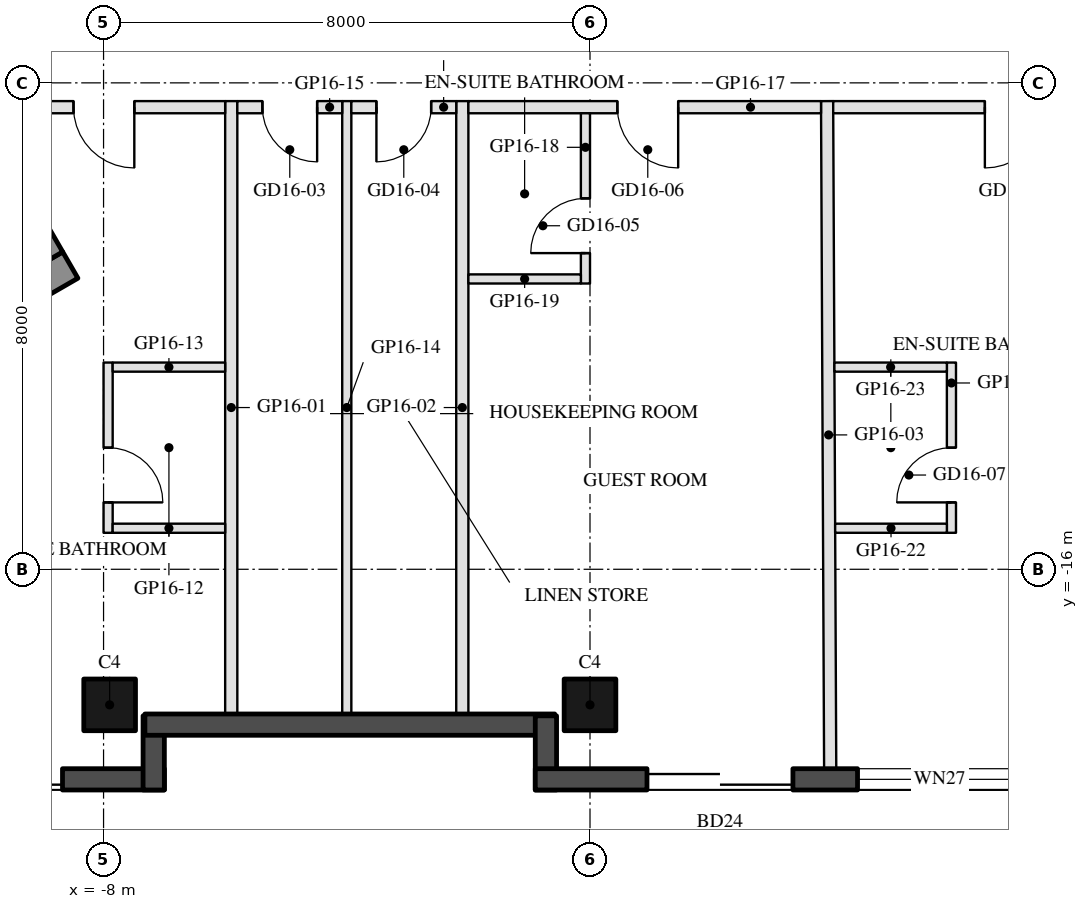
"""IFC4 building model, lengths in metres.
Left out: names, types, materials, properties, quantities, classifications, styles, units other than length and angle.
Written with IfcOpenShell. Run it as: python <this file> out.ifc"""

import sys

from ifc_helpers import new_model, si_unit, direction, frame, frame_2d, origin, origin_2d, place, context, subcontext, project, spatial, rectangle, hollow_rectangle, extrude, element, fill, save


model = new_model("IFC4")
c1 = context("Model", 3, precision=1e-05, world=origin(), true_north=direction((0.0, 1.0)))
c2 = subcontext(c1, "Body", "Model", "MODEL_VIEW")
j1 = project(units=[si_unit("LENGTHUNIT", "METRE"), si_unit("PLANEANGLEUNIT", "RADIAN")], contexts=[c1])
p1 = place(None, origin())
s1 = spatial("IfcSite", under=j1, at=p1, CompositionType="ELEMENT")
p2 = place(p1, origin())
s2 = spatial("IfcBuilding", under=s1, at=p2, CompositionType="ELEMENT")
p3 = place(p2, frame((0.0, 0.0, 179.9)))
s3 = spatial("IfcBuildingStorey", under=s2, at=p3, CompositionType="ELEMENT", Elevation=179.9)
for number, where, z_axis, x_axis in (
    (1, (-7.9, -18.23, 0.0), (0.0, 0.0, 1.0), (-1.0, 0.0, 0.0)),
    (2, (0.0, -18.23, 0.0), (0.0, 0.0, 1.0), (-1.0, 0.0, 0.0)),
):
    element("IfcColumn", number, at=place(p3, frame(where, z_axis=z_axis, x_axis=x_axis)), inside=s3, PredefinedType="COLUMN", context=c2, shape_type="SweptSolid", body=[
        extrude(hollow_rectangle(XDim=0.85, YDim=0.85, WallThickness=0.04, at=origin_2d()), origin(), (0.0, 0.0, 1.0), 3.7),
    ])
p4 = place(p3, frame((-18.816, -19.455, 0.0), z_axis=(0.0, 0.0, 1.0), x_axis=(1.0, 0.0, 0.0)))
e3 = element("IfcWall", 3, at=p4, inside=s3, PredefinedType="SOLIDWALL", context=c2, shape_type="SweptSolid", body=[
    extrude(rectangle(XDim=11.816, YDim=0.35, at=frame_2d((5.908, 0.0))), origin(), (0.0, 0.0, 1.0), 3.55),
])
p5 = place(p4, frame((0.381, 0.0, 0.3)))
e4 = element("IfcOpeningElement", 4, at=p5, cuts=e3, PredefinedType="OPENING", context=c2, shape_type="SweptSolid", body=[
    extrude(rectangle(XDim=1.8, YDim=2.65, at=frame_2d((0.9, 1.325))), frame((0.0, 0.185, 0.0), z_axis=(0.0, -1.0, 0.0), x_axis=(1.0, 0.0, 0.0)), (0.0, 0.0, 1.0), 0.37),
])
p6 = place(p4, frame((7.74, 0.0, 0.0)))
e5 = element("IfcOpeningElement", 5, at=p6, cuts=e3, PredefinedType="OPENING", context=c2, shape_type="SweptSolid", body=[
    extrude(rectangle(XDim=2.4, YDim=2.4, at=frame_2d((1.2, 1.2))), frame((0.0, 0.185, 0.0), z_axis=(0.0, -1.0, 0.0), x_axis=(1.0, 0.0, 0.0)), (0.0, 0.0, 1.0), 0.37),
])
p7 = place(p4, frame((3.791, 0.0, 0.3)))
e6 = element("IfcOpeningElement", 6, at=p7, cuts=e3, PredefinedType="OPENING", context=c2, shape_type="SweptSolid", body=[
    extrude(rectangle(XDim=1.6, YDim=2.65, at=frame_2d((0.8, 1.325))), frame((0.0, 0.185, 0.0), z_axis=(0.0, -1.0, 0.0), x_axis=(1.0, 0.0, 0.0)), (0.0, 0.0, 1.0), 0.37),
])
p8 = place(p4, frame((5.691, 0.0, 0.3)))
e7 = element("IfcOpeningElement", 7, at=p8, cuts=e3, PredefinedType="OPENING", context=c2, shape_type="SweptSolid", body=[
    extrude(rectangle(XDim=1.6, YDim=2.65, at=frame_2d((0.8, 1.325))), frame((0.0, 0.185, 0.0), z_axis=(0.0, -1.0, 0.0), x_axis=(1.0, 0.0, 0.0)), (0.0, 0.0, 1.0), 0.37),
])
p9 = place(p3, frame((-7.175, -19.63, 0.0), z_axis=(0.0, 0.0, 1.0), x_axis=(0.0, 1.0, 0.0)))
e8 = element("IfcWall", 8, at=p9, inside=s3, PredefinedType="SOLIDWALL", context=c2, shape_type="SweptSolid", body=[
    extrude(rectangle(XDim=1.22, YDim=0.35, at=frame_2d((0.61, 0.0))), origin(), (0.0, 0.0, 1.0), 3.55),
])
p10 = place(p3, frame((-7.32, -18.555, 0.0), z_axis=(0.0, 0.0, 1.0), x_axis=(1.0, 0.0, 0.0)))
e9 = element("IfcWall", 9, at=p10, inside=s3, PredefinedType="SOLIDWALL", context=c2, shape_type="SweptSolid", body=[
    extrude(rectangle(XDim=6.74, YDim=0.35, at=frame_2d((3.37, 0.0))), origin(), (0.0, 0.0, 1.0), 3.55),
])
p11 = place(p3, frame((-0.725, -18.41, 0.0), z_axis=(0.0, 0.0, 1.0), x_axis=(0.0, -1.0, 0.0)))
e10 = element("IfcWall", 10, at=p11, inside=s3, PredefinedType="SOLIDWALL", context=c2, shape_type="SweptSolid", body=[
    extrude(rectangle(XDim=1.22, YDim=0.35, at=frame_2d((0.61, 0.0))), origin(), (0.0, 0.0, 1.0), 3.55),
])
p12 = place(p3, frame((-0.9, -19.455, 0.0), z_axis=(0.0, 0.0, 1.0), x_axis=(1.0, 0.0, 0.0)))
e11 = element("IfcWall", 11, at=p12, inside=s3, PredefinedType="SOLIDWALL", context=c2, shape_type="SweptSolid", body=[
    extrude(rectangle(XDim=9.7, YDim=0.35, at=frame_2d((4.85, 0.0))), origin(), (0.0, 0.0, 1.0), 3.55),
])
p13 = place(p12, frame((1.837, 0.0, 0.0)))
e12 = element("IfcOpeningElement", 12, at=p13, cuts=e11, PredefinedType="OPENING", context=c2, shape_type="SweptSolid", body=[
    extrude(rectangle(XDim=2.4, YDim=2.4, at=frame_2d((1.2, 1.2))), frame((0.0, 0.185, 0.0), z_axis=(0.0, -1.0, 0.0), x_axis=(1.0, 0.0, 0.0)), (0.0, 0.0, 1.0), 0.37),
])
p14 = place(p12, frame((5.3, 0.0, 0.3)))
e13 = element("IfcOpeningElement", 13, at=p14, cuts=e11, PredefinedType="OPENING", context=c2, shape_type="SweptSolid", body=[
    extrude(rectangle(XDim=2.7, YDim=2.65, at=frame_2d((1.35, 1.325))), frame((0.0, 0.185, 0.0), z_axis=(0.0, -1.0, 0.0), x_axis=(1.0, 0.0, 0.0)), (0.0, 0.0, 1.0), 0.37),
])
p15 = place(p3, frame((-8.547, -10.997, 0.0), z_axis=(0.0, 0.0, 1.0), x_axis=(-0.866025009528, -0.500000682871, 0.0)))
e14 = element("IfcWall", 14, at=p15, inside=s3, PredefinedType="SHEAR", context=c2, shape_type="SweptSolid", body=[
    extrude(rectangle(XDim=14.837, YDim=0.5, at=frame_2d((7.418, 0.0))), origin(), (0.0, 0.0, 1.0), 3.5),
])
p16 = place(p3, frame((-13.845, -2.22, 0.0), z_axis=(0.0, 0.0, 1.0), x_axis=(0.500004234368, -0.866022959057, 0.0)))
e15 = element("IfcWall", 15, at=p16, inside=s3, PredefinedType="SHEAR", context=c2, shape_type="SweptSolid", body=[
    extrude(rectangle(XDim=10.0, YDim=0.4, at=frame_2d((5.0, 0.0))), origin(), (0.0, 0.0, 1.0), 3.5),
])
p17 = place(p16, frame((3.55, 0.0, 0.0)))
e16 = element("IfcOpeningElement", 16, at=p17, cuts=e15, PredefinedType="OPENING", context=c2, shape_type="SweptSolid", body=[
    extrude(rectangle(XDim=1.1, YDim=2.1, at=frame_2d((0.55, 1.05))), frame((0.0, 0.21, 0.0), z_axis=(0.0, -1.0, 0.0), x_axis=(1.0, 0.0, 0.0)), (0.0, 0.0, 1.0), 0.42),
])
p18 = place(p16, frame((5.85, 0.0, 0.0)))
e17 = element("IfcOpeningElement", 17, at=p18, cuts=e15, PredefinedType="OPENING", context=c2, shape_type="SweptSolid", body=[
    extrude(rectangle(XDim=1.4, YDim=2.1, at=frame_2d((0.7, 1.05))), frame((0.0, 0.21, 0.0), z_axis=(0.0, -1.0, 0.0), x_axis=(1.0, 0.0, 0.0)), (0.0, 0.0, 1.0), 0.42),
])
for number, where, z_axis, x_axis in (
    (18, (-5.9, -18.38, 0.0), (0.0, 0.0, 1.0), (0.0, 1.0, 0.0)),
    (19, (-2.1, -18.38, 0.0), (0.0, 0.0, 1.0), (0.0, 1.0, 0.0)),
):
    element("IfcWall", number, at=place(p3, frame(where, z_axis=z_axis, x_axis=x_axis)), inside=s3, PredefinedType="PARTITIONING", context=c2, shape_type="SweptSolid", body=[
        extrude(rectangle(XDim=10.08, YDim=0.2, at=frame_2d((5.04, 0.0))), origin(), (0.0, 0.0, 1.0), 3.06),
    ])
p19 = place(p3, frame((3.95, -19.28, 0.0), z_axis=(0.0, 0.0, 1.0), x_axis=(-0.004624844922, 0.999989305348, 0.0)))
e20 = element("IfcWall", 20, at=p19, inside=s3, PredefinedType="PARTITIONING", context=c2, shape_type="SweptSolid", body=[
    extrude(rectangle(XDim=10.98, YDim=0.2, at=frame_2d((5.49, 0.0))), origin(), (0.0, 0.0, 1.0), 2.95),
])
p20 = place(p3, frame((-6.0, -8.4, 0.0), z_axis=(0.0, 0.0, 1.0), x_axis=(-1.0, 0.0, 0.0)))
e21 = element("IfcWall", 21, at=p20, inside=s3, PredefinedType="PARTITIONING", context=c2, shape_type="SweptSolid", body=[
    extrude(rectangle(XDim=3.988, YDim=0.2, at=frame_2d((1.994, 0.0))), origin(), (0.0, 0.0, 1.0), 2.95),
])
p21 = place(p20, frame((1.494, 0.0, 0.0)))
e22 = element("IfcOpeningElement", 22, at=p21, cuts=e21, PredefinedType="OPENING", context=c2, shape_type="SweptSolid", body=[
    extrude(rectangle(XDim=1.0, YDim=2.1, at=frame_2d((0.5, 1.05))), frame((0.0, 0.11, 0.0), z_axis=(0.0, -1.0, 0.0), x_axis=(1.0, 0.0, 0.0)), (0.0, 0.0, 1.0), 0.22),
])
p22 = place(p3, frame((-7.925, -12.6, 0.0), z_axis=(0.0, 0.0, 1.0), x_axis=(0.0, -1.0, 0.0)))
e23 = element("IfcWall", 23, at=p22, inside=s3, PredefinedType="PARTITIONING", context=c2, shape_type="SweptSolid", body=[
    extrude(rectangle(XDim=2.8, YDim=0.15, at=frame_2d((1.4, 0.0))), origin(), (0.0, 0.0, 1.0), 2.95),
])
p23 = place(p22, frame((1.4, 0.0, 0.0)))
e24 = element("IfcOpeningElement", 24, at=p23, cuts=e23, PredefinedType="OPENING", context=c2, shape_type="SweptSolid", body=[
    extrude(rectangle(XDim=0.9, YDim=2.1, at=frame_2d((0.45, 1.05))), frame((0.0, 0.085, 0.0), z_axis=(0.0, -1.0, 0.0), x_axis=(1.0, 0.0, 0.0)), (0.0, 0.0, 1.0), 0.17),
])
for number, where, z_axis, x_axis in (
    (25, (-7.85, -15.325, 0.0), (0.0, 0.0, 1.0), (1.0, 0.0, 0.0)),
    (26, (-7.85, -12.675, 0.0), (0.0, 0.0, 1.0), (1.0, 0.0, 0.0)),
):
    element("IfcWall", number, at=place(p3, frame(where, z_axis=z_axis, x_axis=x_axis)), inside=s3, PredefinedType="PARTITIONING", context=c2, shape_type="SweptSolid", body=[
        extrude(rectangle(XDim=1.85, YDim=0.15, at=frame_2d((0.925, 0.0))), origin(), (0.0, 0.0, 1.0), 2.95),
    ])
p24 = place(p3, frame((-4.0, -18.38, 0.0), z_axis=(0.0, 0.0, 1.0), x_axis=(0.0, 1.0, 0.0)))
e27 = element("IfcWall", 27, at=p24, inside=s3, PredefinedType="PARTITIONING", context=c2, shape_type="SweptSolid", body=[
    extrude(rectangle(XDim=10.08, YDim=0.15, at=frame_2d((5.04, 0.0))), origin(), (0.0, 0.0, 1.0), 2.95),
])
p25 = place(p3, frame((-4.075, -8.4, 0.0), z_axis=(0.0, 0.0, 1.0), x_axis=(-1.0, 0.0, 0.0)))
e28 = element("IfcWall", 28, at=p25, inside=s3, PredefinedType="PARTITIONING", context=c2, shape_type="SweptSolid", body=[
    extrude(rectangle(XDim=1.725, YDim=0.2, at=frame_2d((0.863, 0.0))), origin(), (0.0, 0.0, 1.0), 3.55),
])
p26 = place(p25, frame((0.413, 0.0, 0.0)))
e29 = element("IfcOpeningElement", 29, at=p26, cuts=e28, PredefinedType="OPENING", context=c2, shape_type="SweptSolid", body=[
    extrude(rectangle(XDim=0.9, YDim=2.1, at=frame_2d((0.45, 1.05))), frame((0.0, 0.11, 0.0), z_axis=(0.0, -1.0, 0.0), x_axis=(1.0, 0.0, 0.0)), (0.0, 0.0, 1.0), 0.22),
])
p27 = place(p3, frame((-2.2, -8.4, 0.0), z_axis=(0.0, 0.0, 1.0), x_axis=(-1.0, 0.0, 0.0)))
e30 = element("IfcWall", 30, at=p27, inside=s3, PredefinedType="PARTITIONING", context=c2, shape_type="SweptSolid", body=[
    extrude(rectangle(XDim=1.725, YDim=0.2, at=frame_2d((0.863, 0.0))), origin(), (0.0, 0.0, 1.0), 2.95),
])
p28 = place(p27, frame((0.413, 0.0, 0.0)))
e31 = element("IfcOpeningElement", 31, at=p28, cuts=e30, PredefinedType="OPENING", context=c2, shape_type="SweptSolid", body=[
    extrude(rectangle(XDim=0.9, YDim=2.1, at=frame_2d((0.45, 1.05))), frame((0.0, 0.11, 0.0), z_axis=(0.0, -1.0, 0.0), x_axis=(1.0, 0.0, 0.0)), (0.0, 0.0, 1.0), 0.22),
])
p29 = place(p3, frame((3.8, -8.4, 0.0), z_axis=(0.0, 0.0, 1.0), x_axis=(-1.0, 0.0, 0.0)))
e32 = element("IfcWall", 32, at=p29, inside=s3, PredefinedType="PARTITIONING", context=c2, shape_type="SweptSolid", body=[
    extrude(rectangle(XDim=5.8, YDim=0.2, at=frame_2d((2.9, 0.0))), origin(), (0.0, 0.0, 1.0), 2.95),
])
p30 = place(p29, frame((2.35, 0.0, 0.0)))
e33 = element("IfcOpeningElement", 33, at=p30, cuts=e32, PredefinedType="OPENING", context=c2, shape_type="SweptSolid", body=[
    extrude(rectangle(XDim=1.0, YDim=2.1, at=frame_2d((0.5, 1.05))), frame((0.0, 0.11, 0.0), z_axis=(0.0, -1.0, 0.0), x_axis=(1.0, 0.0, 0.0)), (0.0, 0.0, 1.0), 0.22),
])
p31 = place(p3, frame((-0.075, -11.3, 0.0), z_axis=(0.0, 0.0, 1.0), x_axis=(0.0, 1.0, 0.0)))
e34 = element("IfcWall", 34, at=p31, inside=s3, PredefinedType="PARTITIONING", context=c2, shape_type="SweptSolid", body=[
    extrude(rectangle(XDim=2.8, YDim=0.15, at=frame_2d((1.4, 0.0))), origin(), (0.0, 0.0, 1.0), 2.95),
])
p32 = place(p31, frame((0.5, 0.0, 0.0)))
e35 = element("IfcOpeningElement", 35, at=p32, cuts=e34, PredefinedType="OPENING", context=c2, shape_type="SweptSolid", body=[
    extrude(rectangle(XDim=0.9, YDim=2.1, at=frame_2d((0.45, 1.05))), frame((0.0, 0.085, 0.0), z_axis=(0.0, -1.0, 0.0), x_axis=(1.0, 0.0, 0.0)), (0.0, 0.0, 1.0), 0.17),
])
p33 = place(p3, frame((-2.0, -11.225, 0.0), z_axis=(0.0, 0.0, 1.0), x_axis=(1.0, 0.0, 0.0)))
e36 = element("IfcWall", 36, at=p33, inside=s3, PredefinedType="PARTITIONING", context=c2, shape_type="SweptSolid", body=[
    extrude(rectangle(XDim=1.85, YDim=0.15, at=frame_2d((0.925, 0.0))), origin(), (0.0, 0.0, 1.0), 3.55),
])
p34 = place(p3, frame((9.988, -8.4, 0.0), z_axis=(0.0, 0.0, 1.0), x_axis=(-1.0, 0.0, 0.0)))
e37 = element("IfcWall", 37, at=p34, inside=s3, PredefinedType="PARTITIONING", context=c2, shape_type="SweptSolid", body=[
    extrude(rectangle(XDim=5.989, YDim=0.2, at=frame_2d((2.994, 0.0))), origin(), (0.0, 0.0, 1.0), 2.95),
])
p35 = place(p34, frame((2.494, 0.0, 0.0)))
e38 = element("IfcOpeningElement", 38, at=p35, cuts=e37, PredefinedType="OPENING", context=c2, shape_type="SweptSolid", body=[
    extrude(rectangle(XDim=1.0, YDim=2.1, at=frame_2d((0.5, 1.05))), frame((0.0, 0.11, 0.0), z_axis=(0.0, -1.0, 0.0), x_axis=(1.0, 0.0, 0.0)), (0.0, 0.0, 1.0), 0.22),
])
p36 = place(p3, frame((5.944, -15.4, 0.0), z_axis=(0.0, 0.0, 1.0), x_axis=(0.0, 1.0, 0.0)))
e39 = element("IfcWall", 39, at=p36, inside=s3, PredefinedType="PARTITIONING", context=c2, shape_type="SweptSolid", body=[
    extrude(rectangle(XDim=2.8, YDim=0.15, at=frame_2d((1.4, 0.0))), origin(), (0.0, 0.0, 1.0), 3.55),
])
p37 = place(p36, frame((0.5, 0.0, 0.0)))
e40 = element("IfcOpeningElement", 40, at=p37, cuts=e39, PredefinedType="OPENING", context=c2, shape_type="SweptSolid", body=[
    extrude(rectangle(XDim=0.9, YDim=2.1, at=frame_2d((0.45, 1.05))), frame((0.0, 0.085, 0.0), z_axis=(0.0, -1.0, 0.0), x_axis=(1.0, 0.0, 0.0)), (0.0, 0.0, 1.0), 0.17),
])
p38 = place(p3, frame((4.032, -15.325, 0.0), z_axis=(0.0, 0.0, 1.0), x_axis=(1.0, 0.0, 0.0)))
e41 = element("IfcWall", 41, at=p38, inside=s3, PredefinedType="PARTITIONING", context=c2, shape_type="SweptSolid", body=[
    extrude(rectangle(XDim=1.837, YDim=0.15, at=frame_2d((0.918, 0.0))), origin(), (0.0, 0.0, 1.0), 2.95),
])
p39 = place(p3, frame((4.019, -12.675, 0.0), z_axis=(0.0, 0.0, 1.0), x_axis=(1.0, 0.0, 0.0)))
e42 = element("IfcWall", 42, at=p39, inside=s3, PredefinedType="PARTITIONING", context=c2, shape_type="SweptSolid", body=[
    extrude(rectangle(XDim=1.85, YDim=0.15, at=frame_2d((0.925, 0.0))), origin(), (0.0, 0.0, 1.0), 2.95),
])
p40 = place(p6, frame((2.4, 0.0, 0.0), z_axis=(0.0, 0.0, 1.0), x_axis=(-1.0, 0.0, 0.0)))
e43 = element("IfcDoor", 43, at=p40, inside=s3, OperationType="SLIDING_TO_LEFT", PredefinedType="DOOR", context=c2, shape_type="SweptSolid", body=[
    extrude(rectangle(XDim=2.4, YDim=2.4, at=frame_2d((1.2, 1.2))), frame((0.0, 0.025, 0.0), z_axis=(0.0, -1.0, 0.0), x_axis=(1.0, 0.0, 0.0)), (0.0, 0.0, 1.0), 0.05),
])
fill(e5, e43)
p41 = place(p13, frame((2.4, 0.0, 0.0), z_axis=(0.0, 0.0, 1.0), x_axis=(-1.0, 0.0, 0.0)))
e44 = element("IfcDoor", 44, at=p41, inside=s3, OperationType="SLIDING_TO_LEFT", PredefinedType="DOOR", context=c2, shape_type="SweptSolid", body=[
    extrude(rectangle(XDim=2.4, YDim=2.4, at=frame_2d((1.2, 1.2))), frame((0.0, 0.025, 0.0), z_axis=(0.0, -1.0, 0.0), x_axis=(1.0, 0.0, 0.0)), (0.0, 0.0, 1.0), 0.05),
])
fill(e12, e44)
p42 = place(p14, origin())
e45 = element("IfcWindow", 45, at=p42, inside=s3, PartitioningType="SINGLE_PANEL", PredefinedType="WINDOW", context=c2, shape_type="SweptSolid", body=[
    extrude(rectangle(XDim=2.7, YDim=2.65, at=frame_2d((1.35, 1.325))), frame((0.0, 0.03, 0.0), z_axis=(0.0, -1.0, 0.0), x_axis=(1.0, 0.0, 0.0)), (0.0, 0.0, 1.0), 0.06),
])
fill(e13, e45)
p43 = place(p23, origin())
e46 = element("IfcDoor", 46, at=p43, inside=s3, OperationType="SINGLE_SWING_RIGHT", PredefinedType="DOOR", context=c2, shape_type="SweptSolid", body=[
    extrude(rectangle(XDim=0.9, YDim=2.1, at=frame_2d((0.45, 1.05))), frame((0.0, 0.025, 0.0), z_axis=(0.0, -1.0, 0.0), x_axis=(1.0, 0.0, 0.0)), (0.0, 0.0, 1.0), 0.05),
])
fill(e24, e46)
p44 = place(p21, origin())
e47 = element("IfcDoor", 47, at=p44, inside=s3, OperationType="SINGLE_SWING_LEFT", PredefinedType="DOOR", context=c2, shape_type="SweptSolid", body=[
    extrude(rectangle(XDim=1.0, YDim=2.1, at=frame_2d((0.5, 1.05))), frame((0.0, 0.025, 0.0), z_axis=(0.0, -1.0, 0.0), x_axis=(1.0, 0.0, 0.0)), (0.0, 0.0, 1.0), 0.05),
])
fill(e22, e47)
p45 = place(p26, origin())
e48 = element("IfcDoor", 48, at=p45, inside=s3, OperationType="SINGLE_SWING_LEFT", PredefinedType="DOOR", context=c2, shape_type="SweptSolid", body=[
    extrude(rectangle(XDim=0.9, YDim=2.1, at=frame_2d((0.45, 1.05))), frame((0.0, 0.025, 0.0), z_axis=(0.0, -1.0, 0.0), x_axis=(1.0, 0.0, 0.0)), (0.0, 0.0, 1.0), 0.05),
])
fill(e29, e48)
p46 = place(p28, origin())
e49 = element("IfcDoor", 49, at=p46, inside=s3, OperationType="SINGLE_SWING_RIGHT", PredefinedType="DOOR", context=c2, shape_type="SweptSolid", body=[
    extrude(rectangle(XDim=0.9, YDim=2.1, at=frame_2d((0.45, 1.05))), frame((0.0, 0.025, 0.0), z_axis=(0.0, -1.0, 0.0), x_axis=(1.0, 0.0, 0.0)), (0.0, 0.0, 1.0), 0.05),
])
fill(e31, e49)
p47 = place(p32, origin())
e50 = element("IfcDoor", 50, at=p47, inside=s3, OperationType="SINGLE_SWING_LEFT", PredefinedType="DOOR", context=c2, shape_type="SweptSolid", body=[
    extrude(rectangle(XDim=0.9, YDim=2.1, at=frame_2d((0.45, 1.05))), frame((0.0, 0.025, 0.0), z_axis=(0.0, -1.0, 0.0), x_axis=(1.0, 0.0, 0.0)), (0.0, 0.0, 1.0), 0.05),
])
fill(e35, e50)
p48 = place(p30, origin())
e51 = element("IfcDoor", 51, at=p48, inside=s3, OperationType="SINGLE_SWING_LEFT", PredefinedType="DOOR", context=c2, shape_type="SweptSolid", body=[
    extrude(rectangle(XDim=1.0, YDim=2.1, at=frame_2d((0.5, 1.05))), frame((0.0, 0.025, 0.0), z_axis=(0.0, -1.0, 0.0), x_axis=(1.0, 0.0, 0.0)), (0.0, 0.0, 1.0), 0.05),
])
fill(e33, e51)
p49 = place(p37, origin())
e52 = element("IfcDoor", 52, at=p49, inside=s3, OperationType="SINGLE_SWING_LEFT", PredefinedType="DOOR", context=c2, shape_type="SweptSolid", body=[
    extrude(rectangle(XDim=0.9, YDim=2.1, at=frame_2d((0.45, 1.05))), frame((0.0, 0.025, 0.0), z_axis=(0.0, -1.0, 0.0), x_axis=(1.0, 0.0, 0.0)), (0.0, 0.0, 1.0), 0.05),
])
fill(e40, e52)
p50 = place(p35, origin())
e53 = element("IfcDoor", 53, at=p50, inside=s3, OperationType="SINGLE_SWING_RIGHT", PredefinedType="DOOR", context=c2, shape_type="SweptSolid", body=[
    extrude(rectangle(XDim=1.0, YDim=2.1, at=frame_2d((0.5, 1.05))), frame((0.0, 0.025, 0.0), z_axis=(0.0, -1.0, 0.0), x_axis=(1.0, 0.0, 0.0)), (0.0, 0.0, 1.0), 0.05),
])
fill(e38, e53)
save(model, sys.argv[1])
